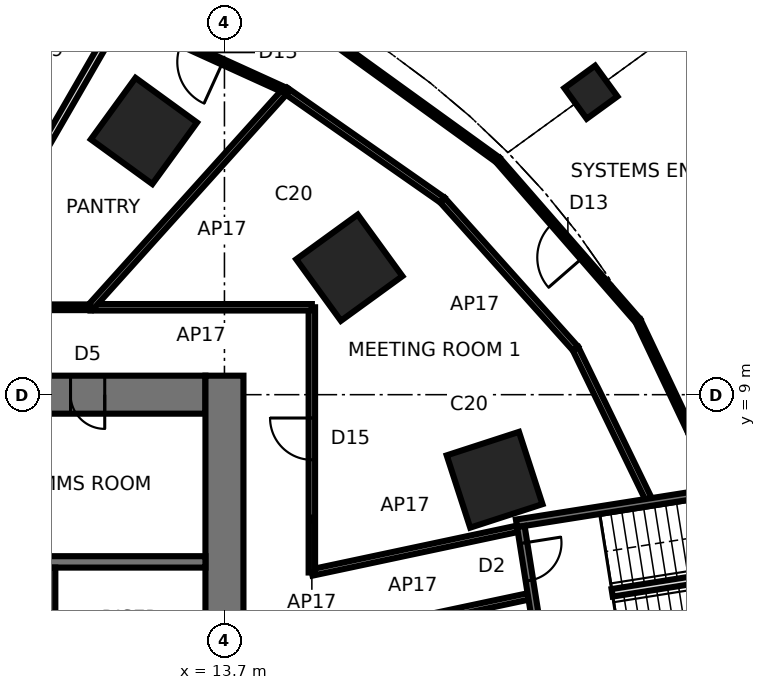
"""IFC4 building model, lengths in metres.
Left out: names, types, materials, properties, quantities, classifications, styles, units other than length and angle.
Written with IfcOpenShell. Run it as: python <this file> out.ifc"""

import sys

from ifc_helpers import new_model, si_unit, direction, frame, frame_2d, origin, origin_2d, place, context, subcontext, project, spatial, rectangle, extrude, element, fill, save


model = new_model("IFC4")
c1 = context("Model", 3, precision=1e-05, world=origin(), true_north=direction((0.0, 1.0)))
c2 = subcontext(c1, "Body", "Model", "MODEL_VIEW")
j1 = project(units=[si_unit("LENGTHUNIT", "METRE"), si_unit("PLANEANGLEUNIT", "RADIAN")], contexts=[c1])
p1 = place(None, origin())
s1 = spatial("IfcSite", under=j1, at=p1, CompositionType="ELEMENT")
p2 = place(p1, origin())
s2 = spatial("IfcBuilding", under=s1, at=p2, CompositionType="ELEMENT")
p3 = place(p2, frame((0.0, 0.0, 5.6)))
s3 = spatial("IfcBuildingStorey", under=s2, at=p3, CompositionType="ELEMENT", Elevation=5.6)
for number, where, z_axis, x_axis in (
    (1, (20.808, 6.761, 0.0), (0.0, 0.0, 1.0), (0.951, 0.309, 0.0)),
    (2, (16.986, 12.341, 0.0), (0.0, 0.0, 1.0), (0.809, 0.588, 0.0)),
    (3, (11.581, 15.94, 0.0), (0.0, 0.0, 1.0), (0.588, 0.809, 0.0)),
):
    element("IfcColumn", number, at=place(p3, frame(where, z_axis=z_axis, x_axis=x_axis)), inside=s3, PredefinedType="COLUMN", context=c2, shape_type="SweptSolid", body=[
        extrude(rectangle(XDim=2.0, YDim=2.0, at=origin_2d()), origin(), (0.0, 0.0, 1.0), 5.0),
    ])
p4 = place(p3, frame((23.342, 16.959, 0.0), z_axis=(0.0, 0.0, 1.0), x_axis=(0.809016994375, 0.587785252292, 0.0)))
e4 = element("IfcColumn", 4, at=p4, inside=s3, PredefinedType="COLUMN", context=c2, shape_type="SweptSolid", body=[
    extrude(rectangle(XDim=1.0, YDim=1.0, at=origin_2d()), origin(), (0.0, 0.0, 1.0), 5.0),
])
p5 = place(p3, frame((13.2, 9.0, 0.0), z_axis=(0.0, 0.0, 1.0), x_axis=(-1.0, 0.0, 0.0)))
e5 = element("IfcWall", 5, at=p5, inside=s3, PredefinedType="SHEAR", context=c2, shape_type="SweptSolid", body=[
    extrude(rectangle(XDim=26.4, YDim=1.0, at=frame_2d((13.2, 0.0))), origin(), (0.0, 0.0, 1.0), 5.0),
])
p6 = place(p5, frame((2.65, 0.0, 0.0)))
e6 = element("IfcOpeningElement", 6, at=p6, cuts=e5, PredefinedType="OPENING", context=c2, shape_type="SweptSolid", body=[
    extrude(rectangle(XDim=0.9, YDim=2.1, at=frame_2d((0.45, 1.05))), frame((0.0, 0.51, 0.0), z_axis=(0.0, -1.0, 0.0), x_axis=(1.0, 0.0, 0.0)), (0.0, 0.0, 1.0), 1.02),
])
p7 = place(p5, frame((9.5, 0.0, 0.0)))
e7 = element("IfcOpeningElement", 7, at=p7, cuts=e5, PredefinedType="OPENING", context=c2, shape_type="SweptSolid", body=[
    extrude(rectangle(XDim=0.9, YDim=2.1, at=frame_2d((0.45, 1.05))), frame((0.0, 0.51, 0.0), z_axis=(0.0, -1.0, 0.0), x_axis=(1.0, 0.0, 0.0)), (0.0, 0.0, 1.0), 1.02),
])
p8 = place(p5, frame((16.0, 0.0, 0.0)))
e8 = element("IfcOpeningElement", 8, at=p8, cuts=e5, PredefinedType="OPENING", context=c2, shape_type="SweptSolid", body=[
    extrude(rectangle(XDim=0.9, YDim=2.1, at=frame_2d((0.45, 1.05))), frame((0.0, 0.51, 0.0), z_axis=(0.0, -1.0, 0.0), x_axis=(1.0, 0.0, 0.0)), (0.0, 0.0, 1.0), 1.02),
])
p9 = place(p5, frame((21.25, 0.0, 0.0)))
e9 = element("IfcOpeningElement", 9, at=p9, cuts=e5, PredefinedType="OPENING", context=c2, shape_type="SweptSolid", body=[
    extrude(rectangle(XDim=0.9, YDim=2.1, at=frame_2d((0.45, 1.05))), frame((0.0, 0.51, 0.0), z_axis=(0.0, -1.0, 0.0), x_axis=(1.0, 0.0, 0.0)), (0.0, 0.0, 1.0), 1.02),
])
p10 = place(p5, frame((24.8, 0.0, 0.0)))
e10 = element("IfcOpeningElement", 10, at=p10, cuts=e5, PredefinedType="OPENING", context=c2, shape_type="SweptSolid", body=[
    extrude(rectangle(XDim=1.0, YDim=2.1, at=frame_2d((0.5, 1.05))), frame((0.0, 0.51, 0.0), z_axis=(0.0, -1.0, 0.0), x_axis=(1.0, 0.0, 0.0)), (0.0, 0.0, 1.0), 1.02),
])
p11 = place(p3, frame((13.7, -9.5, 0.0), z_axis=(0.0, 0.0, 1.0), x_axis=(0.0, 1.0, 0.0)))
e11 = element("IfcWall", 11, at=p11, inside=s3, PredefinedType="SHEAR", context=c2, shape_type="SweptSolid", body=[
    extrude(rectangle(XDim=19.0, YDim=1.0, at=frame_2d((9.5, 0.0))), origin(), (0.0, 0.0, 1.0), 5.0),
])
p12 = place(p11, frame((8.6, 0.0, 0.0)))
e12 = element("IfcOpeningElement", 12, at=p12, cuts=e11, PredefinedType="OPENING", context=c2, shape_type="SweptSolid", body=[
    extrude(rectangle(XDim=1.8, YDim=2.4, at=frame_2d((0.9, 1.2))), frame((0.0, 0.51, 0.0), z_axis=(0.0, -1.0, 0.0), x_axis=(1.0, 0.0, 0.0)), (0.0, 0.0, 1.0), 1.02),
])
p13 = place(p3, frame((-13.2, 4.6, 0.0), z_axis=(0.0, 0.0, 1.0), x_axis=(1.0, 0.0, 0.0)))
e13 = element("IfcWall", 13, at=p13, inside=s3, PredefinedType="SHEAR", context=c2, shape_type="SweptSolid", body=[
    extrude(rectangle(XDim=26.4, YDim=0.3, at=frame_2d((13.2, 0.0))), origin(), (0.0, 0.0, 1.0), 5.0),
])
p14 = place(p3, frame((9.1, 1.75, 0.0), z_axis=(0.0, 0.0, 1.0), x_axis=(0.0, 1.0, 0.0)))
e14 = element("IfcWall", 14, at=p14, inside=s3, PredefinedType="SHEAR", context=c2, shape_type="SweptSolid", body=[
    extrude(rectangle(XDim=2.7, YDim=0.3, at=frame_2d((1.35, 0.0))), origin(), (0.0, 0.0, 1.0), 5.0),
])
p15 = place(p3, frame((16.0, 2.481, 0.0), z_axis=(0.0, 0.0, 1.0), x_axis=(0.978144448143, 0.207926522038, 0.0)))
e15 = element("IfcWall", 15, at=p15, inside=s3, PredefinedType="PARTITIONING", context=c2, shape_type="SweptSolid", body=[
    extrude(rectangle(XDim=5.817, YDim=0.17, at=frame_2d((2.908, 0.0))), origin(), (0.0, 0.0, 1.0), 4.8),
])
p16 = place(p3, frame((21.408, 5.47, 0.0), z_axis=(0.0, 0.0, 1.0), x_axis=(-0.978148748832, -0.207906289368, 0.0)))
e16 = element("IfcWall", 16, at=p16, inside=s3, PredefinedType="PARTITIONING", context=c2, shape_type="SweptSolid", body=[
    extrude(rectangle(XDim=5.529, YDim=0.17, at=frame_2d((2.764, 0.0))), origin(), (0.0, 0.0, 1.0), 4.8),
])
p17 = place(p3, frame((26.666, 6.552, 0.0), z_axis=(0.0, 0.0, 1.0), x_axis=(-0.428597870995, 0.903495359688, 0.0)))
e17 = element("IfcWall", 17, at=p17, inside=s3, PredefinedType="PARTITIONING", context=c2, shape_type="SweptSolid", body=[
    extrude(rectangle(XDim=4.862, YDim=0.15, at=frame_2d((2.431, 0.0))), origin(), (0.0, 0.0, 1.0), 4.8),
])
p18 = place(p3, frame((22.938, 10.212, 0.0), z_axis=(0.0, 0.0, 1.0), x_axis=(0.436655701608, -0.899628700217, 0.0)))
e18 = element("IfcWall", 18, at=p18, inside=s3, PredefinedType="PARTITIONING", context=c2, shape_type="SweptSolid", body=[
    extrude(rectangle(XDim=4.388, YDim=0.17, at=frame_2d((2.194, 0.0))), origin(), (0.0, 0.0, 1.0), 4.8),
])
p19 = place(p3, frame((16.0, 4.321, 0.0), z_axis=(0.0, 0.0, 1.0), x_axis=(0.0, 1.0, 0.0)))
e19 = element("IfcWall", 19, at=p19, inside=s3, PredefinedType="PARTITIONING", context=c2, shape_type="SweptSolid", body=[
    extrude(rectangle(XDim=6.979, YDim=0.17, at=frame_2d((3.49, 0.0))), origin(), (0.0, 0.0, 1.0), 4.8),
])
p20 = place(p19, frame((2.965, 0.0, 0.0)))
e20 = element("IfcOpeningElement", 20, at=p20, cuts=e19, PredefinedType="OPENING", context=c2, shape_type="SweptSolid", body=[
    extrude(rectangle(XDim=1.1, YDim=2.4, at=frame_2d((0.55, 1.2))), frame((0.0, 0.095, 0.0), z_axis=(0.0, -1.0, 0.0), x_axis=(1.0, 0.0, 0.0)), (0.0, 0.0, 1.0), 0.19),
])
p21 = place(p3, frame((19.436, 14.121, 0.0), z_axis=(0.0, 0.0, 1.0), x_axis=(0.667266603128, -0.744818958103, 0.0)))
e21 = element("IfcWall", 21, at=p21, inside=s3, PredefinedType="PARTITIONING", context=c2, shape_type="SweptSolid", body=[
    extrude(rectangle(XDim=5.248, YDim=0.17, at=frame_2d((2.624, 0.0))), origin(), (0.0, 0.0, 1.0), 4.8),
])
p22 = place(p3, frame((24.582, 10.945, 0.0), z_axis=(0.0, 0.0, 1.0), x_axis=(-0.656952161656, 0.753932263069, 0.0)))
e22 = element("IfcWall", 22, at=p22, inside=s3, PredefinedType="PARTITIONING", context=c2, shape_type="SweptSolid", body=[
    extrude(rectangle(XDim=5.616, YDim=0.15, at=frame_2d((2.808, 0.0))), origin(), (0.0, 0.0, 1.0), 4.8),
])
p23 = place(p22, frame((2.208, 0.0, 0.0)))
e23 = element("IfcOpeningElement", 23, at=p23, cuts=e22, PredefinedType="OPENING", context=c2, shape_type="SweptSolid", body=[
    extrude(rectangle(XDim=1.2, YDim=2.4, at=frame_2d((0.6, 1.2))), frame((0.0, 0.085, 0.0), z_axis=(0.0, -1.0, 0.0), x_axis=(1.0, 0.0, 0.0)), (0.0, 0.0, 1.0), 0.17),
])
p24 = place(p3, frame((16.0, 11.3, 0.0), z_axis=(0.0, 0.0, 1.0), x_axis=(-1.0, 0.0, 0.0)))
e24 = element("IfcWall", 24, at=p24, inside=s3, PredefinedType="PARTITIONING", context=c2, shape_type="SweptSolid", body=[
    extrude(rectangle(XDim=5.825, YDim=0.17, at=frame_2d((2.913, 0.0))), origin(), (0.0, 0.0, 1.0), 4.8),
])
p25 = place(p3, frame((15.311, 17.004, 0.0), z_axis=(0.0, 0.0, 1.0), x_axis=(0.819662413359, -0.572846862719, 0.0)))
e25 = element("IfcWall", 25, at=p25, inside=s3, PredefinedType="PARTITIONING", context=c2, shape_type="SweptSolid", body=[
    extrude(rectangle(XDim=5.033, YDim=0.17, at=frame_2d((2.517, 0.0))), origin(), (0.0, 0.0, 1.0), 4.8),
])
p26 = place(p3, frame((20.892, 15.179, 0.0), z_axis=(0.0, 0.0, 1.0), x_axis=(-0.810528990045, 0.585698519971, 0.0)))
e26 = element("IfcWall", 26, at=p26, inside=s3, PredefinedType="PARTITIONING", context=c2, shape_type="SweptSolid", body=[
    extrude(rectangle(XDim=5.4, YDim=0.15, at=frame_2d((2.7, 0.0))), origin(), (0.0, 0.0, 1.0), 4.8),
])
p27 = place(p3, frame((10.175, 11.3, 0.0), z_axis=(0.0, 0.0, 1.0), x_axis=(0.669129902119, 0.743145459577, 0.0)))
e27 = element("IfcWall", 27, at=p27, inside=s3, PredefinedType="PARTITIONING", context=c2, shape_type="SweptSolid", body=[
    extrude(rectangle(XDim=7.676, YDim=0.17, at=frame_2d((3.838, 0.0))), origin(), (0.0, 0.0, 1.0), 4.8),
])
p28 = place(p3, frame((10.175, 11.3, 0.0), z_axis=(0.0, 0.0, 1.0), x_axis=(-1.0, 0.0, 0.0)))
e28 = element("IfcWall", 28, at=p28, inside=s3, PredefinedType="PARTITIONING", context=c2, shape_type="SweptSolid", body=[
    extrude(rectangle(XDim=3.65, YDim=0.15, at=frame_2d((1.825, 0.0))), origin(), (0.0, 0.0, 1.0), 4.8),
])
p29 = place(p3, frame((10.96, 18.983, 0.0), z_axis=(0.0, 0.0, 1.0), x_axis=(0.91025098655, -0.414056930246, 0.0)))
e29 = element("IfcWall", 29, at=p29, inside=s3, PredefinedType="PARTITIONING", context=c2, shape_type="SweptSolid", body=[
    extrude(rectangle(XDim=4.78, YDim=0.15, at=frame_2d((2.39, 0.0))), origin(), (0.0, 0.0, 1.0), 4.8),
])
p30 = place(p29, frame((1.765, 0.0, 0.0)))
e30 = element("IfcOpeningElement", 30, at=p30, cuts=e29, PredefinedType="OPENING", context=c2, shape_type="SweptSolid", body=[
    extrude(rectangle(XDim=1.2, YDim=2.4, at=frame_2d((0.6, 1.2))), frame((0.0, 0.085, 0.0), z_axis=(0.0, -1.0, 0.0), x_axis=(1.0, 0.0, 0.0)), (0.0, 0.0, 1.0), 0.17),
])
p31 = place(p3, frame((6.524, 11.3, 0.0), z_axis=(0.0, 0.0, 1.0), x_axis=(0.499995604398, 0.866027941571, 0.0)))
e31 = element("IfcWall", 31, at=p31, inside=s3, PredefinedType="SOLIDWALL", context=c2, shape_type="SweptSolid", body=[
    extrude(rectangle(XDim=8.872, YDim=0.19, at=frame_2d((4.436, 0.0))), origin(), (0.0, 0.0, 1.0), 4.8),
])
p32 = place(p3, frame((21.385, 5.615, 0.0), z_axis=(0.0, 0.0, 1.0), x_axis=(0.987689398324, 0.156427786655, 0.0)))
e32 = element("IfcWall", 32, at=p32, inside=s3, PredefinedType="SOLIDWALL", context=c2, shape_type="SweptSolid", body=[
    extrude(rectangle(XDim=8.3, YDim=0.2, at=frame_2d((4.15, 0.0))), origin(), (0.0, 0.0, 1.0), 4.8),
])
p33 = place(p3, frame((22.156, 1.383, 0.0), z_axis=(0.0, 0.0, 1.0), x_axis=(-0.156428225752, 0.987689328781, 0.0)))
e33 = element("IfcWall", 33, at=p33, inside=s3, PredefinedType="SOLIDWALL", context=c2, shape_type="SweptSolid", body=[
    extrude(rectangle(XDim=4.2, YDim=0.2, at=frame_2d((2.1, 0.0))), origin(), (0.0, 0.0, 1.0), 4.8),
])
p34 = place(p33, frame((2.76, 0.0, 0.0)))
e34 = element("IfcOpeningElement", 34, at=p34, cuts=e33, PredefinedType="OPENING", context=c2, shape_type="SweptSolid", body=[
    extrude(rectangle(XDim=1.0, YDim=2.1, at=frame_2d((0.5, 1.05))), frame((0.0, 0.11, 0.0), z_axis=(0.0, -1.0, 0.0), x_axis=(1.0, 0.0, 0.0)), (0.0, 0.0, 1.0), 0.22),
])
p35 = place(p3, frame((23.902, 3.786, 0.0), z_axis=(0.0, 0.0, 1.0), x_axis=(0.987681481506, 0.156477765482, 0.0)))
e35 = element("IfcWall", 35, at=p35, inside=s3, PredefinedType="SOLIDWALL", context=c2, shape_type="SweptSolid", body=[
    extrude(rectangle(XDim=3.796, YDim=0.2, at=frame_2d((1.898, 0.0))), origin(), (0.0, 0.0, 1.0), 5.0),
])
p36 = place(p6, origin())
e36 = element("IfcDoor", 36, at=p36, inside=s3, OperationType="SINGLE_SWING_LEFT", PredefinedType="DOOR", context=c2, shape_type="SweptSolid", body=[
    extrude(rectangle(XDim=0.82, YDim=2.06, at=frame_2d((0.45, 1.03))), frame((0.0, 0.025, 0.0), z_axis=(0.0, -1.0, 0.0), x_axis=(1.0, 0.0, 0.0)), (0.0, 0.0, 1.0), 0.05),
    extrude(rectangle(XDim=0.04, YDim=2.1, at=frame_2d((0.02, 1.05))), frame((0.0, 0.25, 0.0), z_axis=(0.0, -1.0, 0.0), x_axis=(1.0, 0.0, 0.0)), (0.0, 0.0, 1.0), 0.5),
    extrude(rectangle(XDim=0.04, YDim=2.1, at=frame_2d((0.88, 1.05))), frame((0.0, 0.25, 0.0), z_axis=(0.0, -1.0, 0.0), x_axis=(1.0, 0.0, 0.0)), (0.0, 0.0, 1.0), 0.5),
    extrude(rectangle(XDim=0.82, YDim=0.04, at=frame_2d((0.45, 2.08))), frame((0.0, 0.25, 0.0), z_axis=(0.0, -1.0, 0.0), x_axis=(1.0, 0.0, 0.0)), (0.0, 0.0, 1.0), 0.5),
])
fill(e6, e36)
p37 = place(p20, origin())
e37 = element("IfcDoor", 37, at=p37, inside=s3, OperationType="SINGLE_SWING_RIGHT", PredefinedType="DOOR", context=c2, shape_type="SweptSolid", body=[
    extrude(rectangle(XDim=1.1, YDim=2.4, at=frame_2d((0.55, 1.2))), frame((0.0, 0.025, 0.0), z_axis=(0.0, -1.0, 0.0), x_axis=(1.0, 0.0, 0.0)), (0.0, 0.0, 1.0), 0.05),
])
fill(e20, e37)
p38 = place(p30, frame((1.2, 0.0, 0.0), z_axis=(0.0, 0.0, 1.0), x_axis=(-1.0, 0.0, 0.0)))
e38 = element("IfcDoor", 38, at=p38, inside=s3, OperationType="SINGLE_SWING_LEFT", PredefinedType="DOOR", context=c2, shape_type="SweptSolid", body=[
    extrude(rectangle(XDim=1.2, YDim=2.4, at=frame_2d((0.6, 1.2))), frame((0.0, 0.025, 0.0), z_axis=(0.0, -1.0, 0.0), x_axis=(1.0, 0.0, 0.0)), (0.0, 0.0, 1.0), 0.05),
])
fill(e30, e38)
p39 = place(p23, origin())
e39 = element("IfcDoor", 39, at=p39, inside=s3, OperationType="SINGLE_SWING_LEFT", PredefinedType="DOOR", context=c2, shape_type="SweptSolid", body=[
    extrude(rectangle(XDim=1.2, YDim=2.4, at=frame_2d((0.6, 1.2))), frame((0.0, 0.025, 0.0), z_axis=(0.0, -1.0, 0.0), x_axis=(1.0, 0.0, 0.0)), (0.0, 0.0, 1.0), 0.05),
])
fill(e23, e39)
p40 = place(p34, frame((1.0, 0.0, 0.0), z_axis=(0.0, 0.0, 1.0), x_axis=(-1.0, 0.0, 0.0)))
e40 = element("IfcDoor", 40, at=p40, inside=s3, OperationType="SINGLE_SWING_LEFT", PredefinedType="DOOR", context=c2, shape_type="SweptSolid", body=[
    extrude(rectangle(XDim=1.0, YDim=2.1, at=frame_2d((0.5, 1.05))), frame((0.0, 0.025, 0.0), z_axis=(0.0, -1.0, 0.0), x_axis=(1.0, 0.0, 0.0)), (0.0, 0.0, 1.0), 0.05),
])
fill(e34, e40)
save(model, sys.argv[1])
